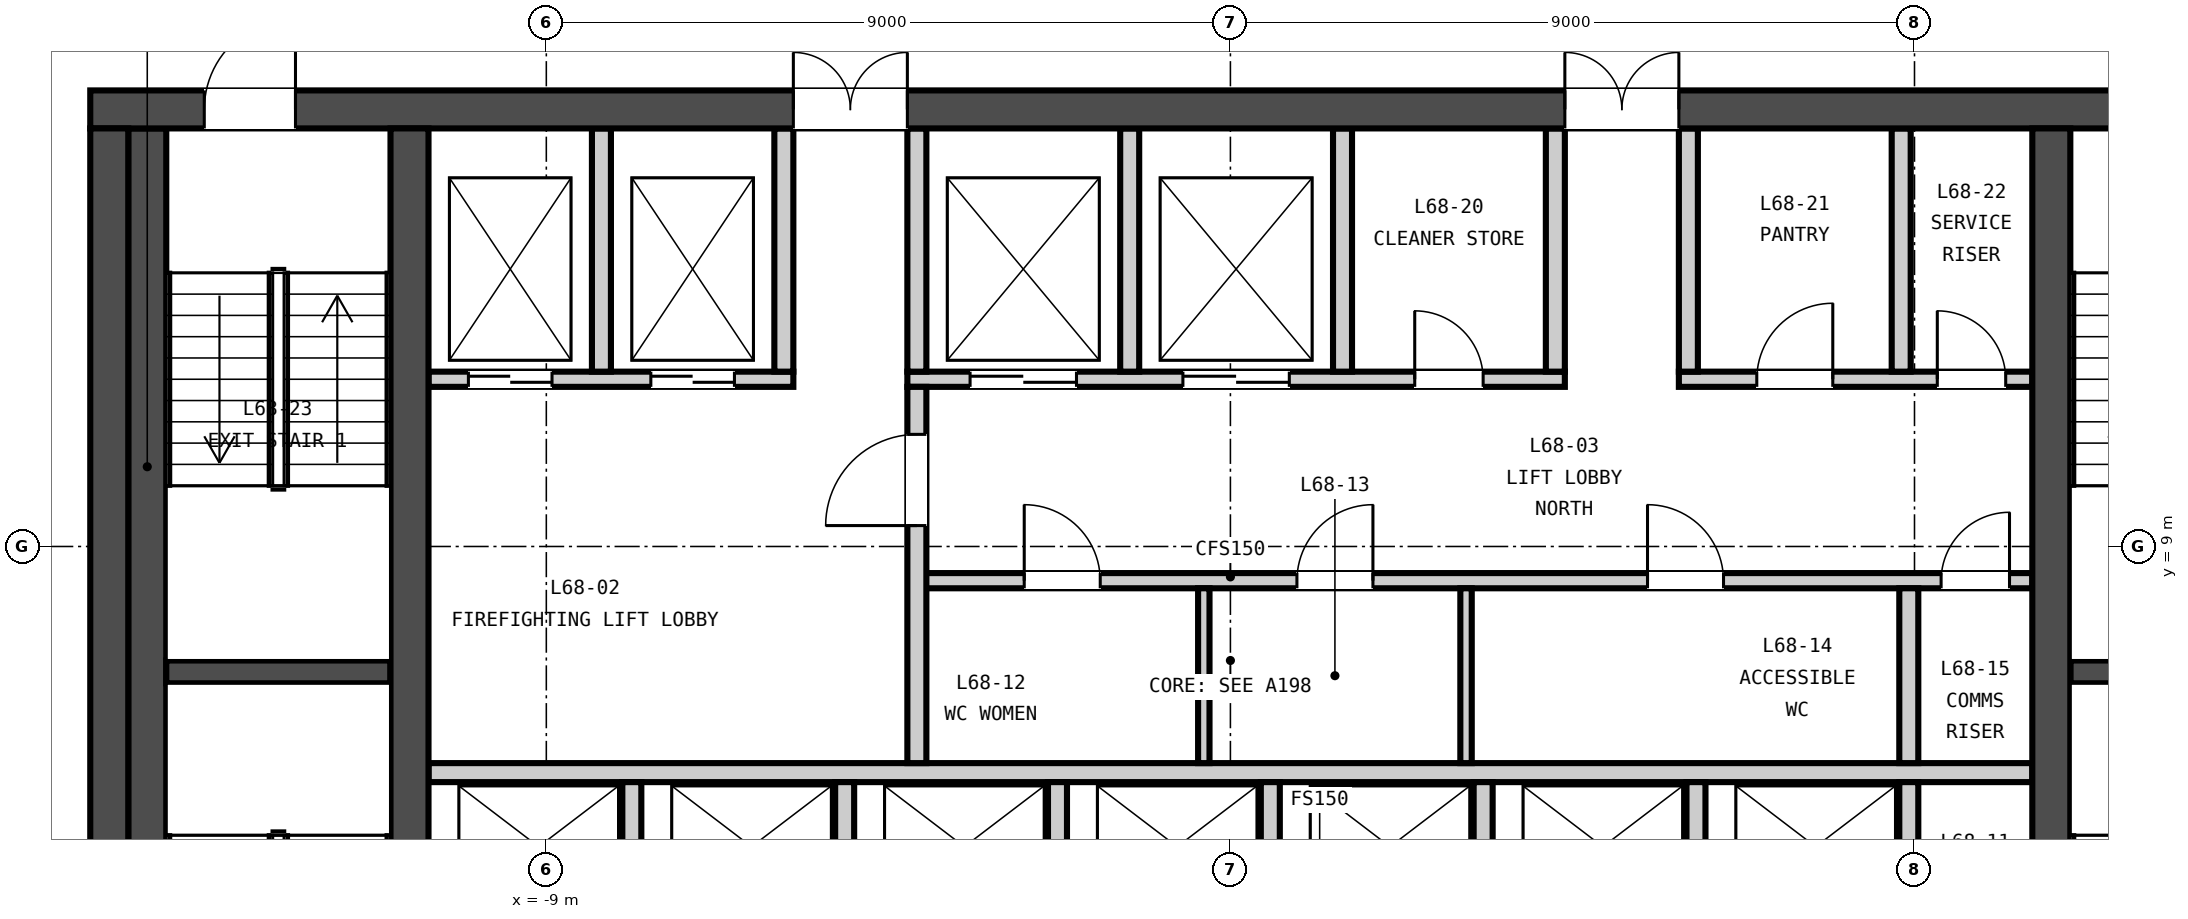
"""IFC4 building model, lengths in metres.
Left out: names, types, materials, properties, quantities, classifications, styles, units other than length and angle.
Written with IfcOpenShell. Run it as: python <this file> out.ifc"""

import sys

from ifc_helpers import new_model, si_unit, direction, frame, frame_2d, origin, place, context, subcontext, project, spatial, rectangle, extrude, element, fill, save


model = new_model("IFC4")
c1 = context("Model", 3, precision=1e-05, world=origin(), true_north=direction((0.0, 1.0)))
c2 = subcontext(c1, "Body", "Model", "MODEL_VIEW")
j1 = project(units=[si_unit("LENGTHUNIT", "METRE"), si_unit("PLANEANGLEUNIT", "RADIAN")], contexts=[c1])
p1 = place(None, origin())
s1 = spatial("IfcSite", under=j1, at=p1, CompositionType="ELEMENT")
p2 = place(p1, origin())
s2 = spatial("IfcBuilding", under=s1, at=p2, CompositionType="ELEMENT")
p3 = place(p2, frame((0.0, 0.0, 268.25)))
s3 = spatial("IfcBuildingStorey", under=s2, at=p3, CompositionType="ELEMENT", Elevation=268.25)
p4 = place(p3, frame((-15.0, 14.75, -0.15), z_axis=(0.0, 0.0, 1.0), x_axis=(1.0, 0.0, 0.0)))
e1 = element("IfcWall", 1, at=p4, inside=s3, PredefinedType="SOLIDWALL", context=c2, shape_type="SweptSolid", body=[
    extrude(rectangle(XDim=30.0, YDim=0.5, at=frame_2d((15.0, 0.0))), origin(), (0.0, 0.0, 1.0), 3.65),
])
p5 = place(p4, frame((9.25, 0.0, 0.15)))
e2 = element("IfcOpeningElement", 2, at=p5, cuts=e1, PredefinedType="OPENING", context=c2, shape_type="SweptSolid", body=[
    extrude(rectangle(XDim=1.5, YDim=2.1, at=frame_2d((0.75, 1.05))), frame((0.0, 0.26, 0.0), z_axis=(0.0, -1.0, 0.0), x_axis=(1.0, 0.0, 0.0)), (0.0, 0.0, 1.0), 0.52),
])
p6 = place(p4, frame((19.4, 0.0, 0.15)))
e3 = element("IfcOpeningElement", 3, at=p6, cuts=e1, PredefinedType="OPENING", context=c2, shape_type="SweptSolid", body=[
    extrude(rectangle(XDim=1.5, YDim=2.1, at=frame_2d((0.75, 1.05))), frame((0.0, 0.26, 0.0), z_axis=(0.0, -1.0, 0.0), x_axis=(1.0, 0.0, 0.0)), (0.0, 0.0, 1.0), 0.52),
])
p7 = place(p4, frame((1.5, 0.0, 0.15)))
e4 = element("IfcOpeningElement", 4, at=p7, cuts=e1, PredefinedType="OPENING", context=c2, shape_type="SweptSolid", body=[
    extrude(rectangle(XDim=1.2, YDim=2.1, at=frame_2d((0.6, 1.05))), frame((0.0, 0.26, 0.0), z_axis=(0.0, -1.0, 0.0), x_axis=(1.0, 0.0, 0.0)), (0.0, 0.0, 1.0), 0.52),
])
p8 = place(p4, frame((27.3, 0.0, 0.15)))
e5 = element("IfcOpeningElement", 5, at=p8, cuts=e1, PredefinedType="OPENING", context=c2, shape_type="SweptSolid", body=[
    extrude(rectangle(XDim=1.2, YDim=2.1, at=frame_2d((0.6, 1.05))), frame((0.0, 0.26, 0.0), z_axis=(0.0, -1.0, 0.0), x_axis=(1.0, 0.0, 0.0)), (0.0, 0.0, 1.0), 0.52),
])
for number, where, z_axis, x_axis in (
    (6, (-14.75, 0.5, -0.15), (0.0, 0.0, 1.0), (0.0, 1.0, 0.0)),
    (7, (-10.8, 0.5, -0.15), (0.0, 0.0, 1.0), (0.0, 1.0, 0.0)),
    (8, (10.8, 0.5, -0.15), (0.0, 0.0, 1.0), (0.0, 1.0, 0.0)),
):
    element("IfcWall", number, at=place(p3, frame(where, z_axis=z_axis, x_axis=x_axis)), inside=s3, PredefinedType="SOLIDWALL", context=c2, shape_type="SweptSolid", body=[
        extrude(rectangle(XDim=14.0, YDim=0.5, at=frame_2d((7.0, 0.0))), origin(), (0.0, 0.0, 1.0), 3.65),
    ])
p9 = place(p3, frame((-10.55, 6.025, 0.0), z_axis=(0.0, 0.0, 1.0), x_axis=(1.0, 0.0, 0.0)))
e9 = element("IfcWall", 9, at=p9, inside=s3, PredefinedType="PARTITIONING", context=c2, shape_type="SweptSolid", body=[
    extrude(rectangle(XDim=21.1, YDim=0.25, at=frame_2d((10.55, 0.0))), origin(), (0.0, 0.0, 1.0), 3.5),
])
p10 = place(p3, frame((-4.125, 8.55, 0.0), z_axis=(0.0, 0.0, 1.0), x_axis=(1.0, 0.0, 0.0)))
e10 = element("IfcWall", 10, at=p10, inside=s3, PredefinedType="PARTITIONING", context=c2, shape_type="SweptSolid", body=[
    extrude(rectangle(XDim=14.675, YDim=0.2, at=frame_2d((7.337, 0.0))), origin(), (0.0, 0.0, 1.0), 3.5),
])
p11 = place(p10, frame((1.413, 0.0, 0.0)))
e11 = element("IfcOpeningElement", 11, at=p11, cuts=e10, PredefinedType="OPENING", context=c2, shape_type="SweptSolid", body=[
    extrude(rectangle(XDim=1.0, YDim=2.1, at=frame_2d((0.5, 1.05))), frame((0.0, 0.11, 0.0), z_axis=(0.0, -1.0, 0.0), x_axis=(1.0, 0.0, 0.0)), (0.0, 0.0, 1.0), 0.22),
])
p12 = place(p10, frame((5.0, 0.0, 0.0)))
e12 = element("IfcOpeningElement", 12, at=p12, cuts=e10, PredefinedType="OPENING", context=c2, shape_type="SweptSolid", body=[
    extrude(rectangle(XDim=1.0, YDim=2.1, at=frame_2d((0.5, 1.05))), frame((0.0, 0.11, 0.0), z_axis=(0.0, -1.0, 0.0), x_axis=(1.0, 0.0, 0.0)), (0.0, 0.0, 1.0), 0.22),
])
p13 = place(p10, frame((9.613, 0.0, 0.0)))
e13 = element("IfcOpeningElement", 13, at=p13, cuts=e10, PredefinedType="OPENING", context=c2, shape_type="SweptSolid", body=[
    extrude(rectangle(XDim=1.0, YDim=2.1, at=frame_2d((0.5, 1.05))), frame((0.0, 0.11, 0.0), z_axis=(0.0, -1.0, 0.0), x_axis=(1.0, 0.0, 0.0)), (0.0, 0.0, 1.0), 0.22),
])
p14 = place(p10, frame((13.475, 0.0, 0.0)))
e14 = element("IfcOpeningElement", 14, at=p14, cuts=e10, PredefinedType="OPENING", context=c2, shape_type="SweptSolid", body=[
    extrude(rectangle(XDim=0.9, YDim=2.1, at=frame_2d((0.45, 1.05))), frame((0.0, 0.11, 0.0), z_axis=(0.0, -1.0, 0.0), x_axis=(1.0, 0.0, 0.0)), (0.0, 0.0, 1.0), 0.22),
])
p15 = place(p3, frame((-10.55, 11.2, 0.0), z_axis=(0.0, 0.0, 1.0), x_axis=(1.0, 0.0, 0.0)))
e15 = element("IfcWall", 15, at=p15, inside=s3, PredefinedType="PARTITIONING", context=c2, shape_type="SweptSolid", body=[
    extrude(rectangle(XDim=4.8, YDim=0.2, at=frame_2d((2.4, 0.0))), origin(), (0.0, 0.0, 1.0), 3.5),
])
p16 = place(p15, frame((0.525, 0.0, 0.0)))
e16 = element("IfcOpeningElement", 16, at=p16, cuts=e15, PredefinedType="OPENING", context=c2, shape_type="SweptSolid", body=[
    extrude(rectangle(XDim=1.1, YDim=2.1, at=frame_2d((0.55, 1.05))), frame((0.0, 0.11, 0.0), z_axis=(0.0, -1.0, 0.0), x_axis=(1.0, 0.0, 0.0)), (0.0, 0.0, 1.0), 0.22),
])
p17 = place(p15, frame((2.925, 0.0, 0.0)))
e17 = element("IfcOpeningElement", 17, at=p17, cuts=e15, PredefinedType="OPENING", context=c2, shape_type="SweptSolid", body=[
    extrude(rectangle(XDim=1.1, YDim=2.1, at=frame_2d((0.55, 1.05))), frame((0.0, 0.11, 0.0), z_axis=(0.0, -1.0, 0.0), x_axis=(1.0, 0.0, 0.0)), (0.0, 0.0, 1.0), 0.22),
])
p18 = place(p3, frame((-4.25, 11.2, 0.0), z_axis=(0.0, 0.0, 1.0), x_axis=(1.0, 0.0, 0.0)))
e18 = element("IfcWall", 18, at=p18, inside=s3, PredefinedType="PARTITIONING", context=c2, shape_type="SweptSolid", body=[
    extrude(rectangle(XDim=8.65, YDim=0.2, at=frame_2d((4.325, 0.0))), origin(), (0.0, 0.0, 1.0), 3.5),
])
p19 = place(p18, frame((0.825, 0.0, 0.0)))
e19 = element("IfcOpeningElement", 19, at=p19, cuts=e18, PredefinedType="OPENING", context=c2, shape_type="SweptSolid", body=[
    extrude(rectangle(XDim=1.4, YDim=2.1, at=frame_2d((0.7, 1.05))), frame((0.0, 0.11, 0.0), z_axis=(0.0, -1.0, 0.0), x_axis=(1.0, 0.0, 0.0)), (0.0, 0.0, 1.0), 0.22),
])
p20 = place(p18, frame((3.625, 0.0, 0.0)))
e20 = element("IfcOpeningElement", 20, at=p20, cuts=e18, PredefinedType="OPENING", context=c2, shape_type="SweptSolid", body=[
    extrude(rectangle(XDim=1.4, YDim=2.1, at=frame_2d((0.7, 1.05))), frame((0.0, 0.11, 0.0), z_axis=(0.0, -1.0, 0.0), x_axis=(1.0, 0.0, 0.0)), (0.0, 0.0, 1.0), 0.22),
])
p21 = place(p18, frame((6.675, 0.0, 0.0)))
e21 = element("IfcOpeningElement", 21, at=p21, cuts=e18, PredefinedType="OPENING", context=c2, shape_type="SweptSolid", body=[
    extrude(rectangle(XDim=0.9, YDim=2.1, at=frame_2d((0.45, 1.05))), frame((0.0, 0.11, 0.0), z_axis=(0.0, -1.0, 0.0), x_axis=(1.0, 0.0, 0.0)), (0.0, 0.0, 1.0), 0.22),
])
p22 = place(p3, frame((5.9, 11.2, 0.0), z_axis=(0.0, 0.0, 1.0), x_axis=(1.0, 0.0, 0.0)))
e22 = element("IfcWall", 22, at=p22, inside=s3, PredefinedType="PARTITIONING", context=c2, shape_type="SweptSolid", body=[
    extrude(rectangle(XDim=4.65, YDim=0.2, at=frame_2d((2.325, 0.0))), origin(), (0.0, 0.0, 1.0), 3.5),
])
p23 = place(p22, frame((1.025, 0.0, 0.0)))
e23 = element("IfcOpeningElement", 23, at=p23, cuts=e22, PredefinedType="OPENING", context=c2, shape_type="SweptSolid", body=[
    extrude(rectangle(XDim=1.0, YDim=2.1, at=frame_2d((0.5, 1.05))), frame((0.0, 0.11, 0.0), z_axis=(0.0, -1.0, 0.0), x_axis=(1.0, 0.0, 0.0)), (0.0, 0.0, 1.0), 0.22),
])
p24 = place(p22, frame((3.4, 0.0, 0.0)))
e24 = element("IfcOpeningElement", 24, at=p24, cuts=e22, PredefinedType="OPENING", context=c2, shape_type="SweptSolid", body=[
    extrude(rectangle(XDim=0.9, YDim=2.1, at=frame_2d((0.45, 1.05))), frame((0.0, 0.11, 0.0), z_axis=(0.0, -1.0, 0.0), x_axis=(1.0, 0.0, 0.0)), (0.0, 0.0, 1.0), 0.22),
])
p25 = place(p3, frame((-4.125, 6.15, 0.0), z_axis=(0.0, 0.0, 1.0), x_axis=(0.0, 1.0, 0.0)))
e25 = element("IfcWall", 25, at=p25, inside=s3, PredefinedType="PARTITIONING", context=c2, shape_type="SweptSolid", body=[
    extrude(rectangle(XDim=4.95, YDim=0.25, at=frame_2d((2.475, 0.0))), origin(), (0.0, 0.0, 1.0), 3.5),
])
p26 = place(p25, frame((3.125, 0.0, 0.0)))
e26 = element("IfcOpeningElement", 26, at=p26, cuts=e25, PredefinedType="OPENING", context=c2, shape_type="SweptSolid", body=[
    extrude(rectangle(XDim=1.2, YDim=2.1, at=frame_2d((0.6, 1.05))), frame((0.0, 0.135, 0.0), z_axis=(0.0, -1.0, 0.0), x_axis=(1.0, 0.0, 0.0)), (0.0, 0.0, 1.0), 0.27),
])
for number, where, z_axis, x_axis in (
    (27, (-7.875, 3.6, 0.0), (0.0, 0.0, 1.0), (0.0, 1.0, 0.0)),
    (28, (-5.075, 3.6, 0.0), (0.0, 0.0, 1.0), (0.0, 1.0, 0.0)),
    (29, (-2.275, 3.6, 0.0), (0.0, 0.0, 1.0), (0.0, 1.0, 0.0)),
    (30, (0.525, 3.6, 0.0), (0.0, 0.0, 1.0), (0.0, 1.0, 0.0)),
    (31, (3.325, 3.6, 0.0), (0.0, 0.0, 1.0), (0.0, 1.0, 0.0)),
    (32, (6.125, 3.6, 0.0), (0.0, 0.0, 1.0), (0.0, 1.0, 0.0)),
    (33, (8.925, 3.6, 0.0), (0.0, 0.0, 1.0), (0.0, 1.0, 0.0)),
):
    element("IfcWall", number, at=place(p3, frame(where, z_axis=z_axis, x_axis=x_axis)), inside=s3, PredefinedType="PARTITIONING", context=c2, shape_type="SweptSolid", body=[
        extrude(rectangle(XDim=2.3, YDim=0.25, at=frame_2d((1.15, 0.0))), origin(), (0.0, 0.0, 1.0), 3.5),
    ])
for number, where, z_axis, x_axis in (
    (34, (-0.35, 6.15, 0.0), (0.0, 0.0, 1.0), (0.0, 1.0, 0.0)),
    (35, (3.1, 6.15, 0.0), (0.0, 0.0, 1.0), (0.0, 1.0, 0.0)),
):
    element("IfcWall", number, at=place(p3, frame(where, z_axis=z_axis, x_axis=x_axis)), inside=s3, PredefinedType="PARTITIONING", context=c2, shape_type="SweptSolid", body=[
        extrude(rectangle(XDim=2.3, YDim=0.15, at=frame_2d((1.15, 0.0))), origin(), (0.0, 0.0, 1.0), 3.5),
    ])
p27 = place(p3, frame((8.925, 6.15, 0.0), z_axis=(0.0, 0.0, 1.0), x_axis=(0.0, 1.0, 0.0)))
e36 = element("IfcWall", 36, at=p27, inside=s3, PredefinedType="PARTITIONING", context=c2, shape_type="SweptSolid", body=[
    extrude(rectangle(XDim=2.3, YDim=0.25, at=frame_2d((1.15, 0.0))), origin(), (0.0, 0.0, 1.0), 3.5),
])
for number, where, z_axis, x_axis in (
    (37, (-8.275, 11.3, 0.0), (0.0, 0.0, 1.0), (0.0, 1.0, 0.0)),
    (38, (-5.875, 11.3, 0.0), (0.0, 0.0, 1.0), (0.0, 1.0, 0.0)),
    (39, (-4.125, 11.3, 0.0), (0.0, 0.0, 1.0), (0.0, 1.0, 0.0)),
    (40, (-1.325, 11.3, 0.0), (0.0, 0.0, 1.0), (0.0, 1.0, 0.0)),
    (41, (1.475, 11.3, 0.0), (0.0, 0.0, 1.0), (0.0, 1.0, 0.0)),
    (42, (4.275, 11.3, 0.0), (0.0, 0.0, 1.0), (0.0, 1.0, 0.0)),
    (43, (6.025, 11.3, 0.0), (0.0, 0.0, 1.0), (0.0, 1.0, 0.0)),
    (44, (8.825, 11.3, 0.0), (0.0, 0.0, 1.0), (0.0, 1.0, 0.0)),
):
    element("IfcWall", number, at=place(p3, frame(where, z_axis=z_axis, x_axis=x_axis)), inside=s3, PredefinedType="PARTITIONING", context=c2, shape_type="SweptSolid", body=[
        extrude(rectangle(XDim=3.2, YDim=0.25, at=frame_2d((1.6, 0.0))), origin(), (0.0, 0.0, 1.0), 3.5),
    ])
p28 = place(p3, frame((-14.0, 7.35, 0.0), z_axis=(0.0, 0.0, 1.0), x_axis=(1.0, 0.0, 0.0)))
e45 = element("IfcWall", 45, at=p28, inside=s3, PredefinedType="SOLIDWALL", context=c2, shape_type="SweptSolid", body=[
    extrude(rectangle(XDim=2.95, YDim=0.3, at=frame_2d((1.475, 0.0))), origin(), (0.0, 0.0, 1.0), 3.5),
])
p29 = place(p3, frame((-14.25, 0.5, 0.0), z_axis=(0.0, 0.0, 1.0), x_axis=(0.0, 1.0, 0.0)))
e46 = element("IfcWall", 46, at=p29, inside=s3, PredefinedType="SOLIDWALL", context=c2, shape_type="SweptSolid", body=[
    extrude(rectangle(XDim=14.0, YDim=0.5, at=frame_2d((7.0, 0.0))), origin(), (0.0, 0.0, 1.0), 3.5),
])
p30 = place(p3, frame((11.05, 7.35, 0.0), z_axis=(0.0, 0.0, 1.0), x_axis=(1.0, 0.0, 0.0)))
e47 = element("IfcWall", 47, at=p30, inside=s3, PredefinedType="SOLIDWALL", context=c2, shape_type="SweptSolid", body=[
    extrude(rectangle(XDim=2.95, YDim=0.3, at=frame_2d((1.475, 0.0))), origin(), (0.0, 0.0, 1.0), 3.5),
])
p31 = place(p3, frame((-17.377, 11.232, 0.0), z_axis=(0.0, 0.0, 1.0), x_axis=(0.309001632963, 0.951061507383, 0.0)))
e48 = element("IfcWall", 48, at=p31, inside=s3, PredefinedType="PARTITIONING", context=c2, shape_type="SweptSolid", body=[
    extrude(rectangle(XDim=6.211, YDim=0.15, at=frame_2d((3.105, 0.0))), origin(), (0.0, 0.0, 1.0), 2.751),
])
p32 = place(p26, origin())
e49 = element("IfcDoor", 49, at=p32, inside=s3, OperationType="SINGLE_SWING_LEFT", PredefinedType="DOOR", context=c2, shape_type="SweptSolid", body=[
    extrude(rectangle(XDim=1.2, YDim=2.1, at=frame_2d((0.6, 1.05))), frame((0.0, 0.025, 0.0), z_axis=(0.0, -1.0, 0.0), x_axis=(1.0, 0.0, 0.0)), (0.0, 0.0, 1.0), 0.05),
])
fill(e26, e49)
p33 = place(p11, origin())
e50 = element("IfcDoor", 50, at=p33, inside=s3, OperationType="SINGLE_SWING_LEFT", PredefinedType="DOOR", context=c2, shape_type="SweptSolid", body=[
    extrude(rectangle(XDim=1.0, YDim=2.1, at=frame_2d((0.5, 1.05))), frame((0.0, 0.025, 0.0), z_axis=(0.0, -1.0, 0.0), x_axis=(1.0, 0.0, 0.0)), (0.0, 0.0, 1.0), 0.05),
])
fill(e11, e50)
p34 = place(p12, origin())
e51 = element("IfcDoor", 51, at=p34, inside=s3, OperationType="SINGLE_SWING_RIGHT", PredefinedType="DOOR", context=c2, shape_type="SweptSolid", body=[
    extrude(rectangle(XDim=1.0, YDim=2.1, at=frame_2d((0.5, 1.05))), frame((0.0, 0.025, 0.0), z_axis=(0.0, -1.0, 0.0), x_axis=(1.0, 0.0, 0.0)), (0.0, 0.0, 1.0), 0.05),
])
fill(e12, e51)
p35 = place(p13, origin())
e52 = element("IfcDoor", 52, at=p35, inside=s3, OperationType="SINGLE_SWING_LEFT", PredefinedType="DOOR", context=c2, shape_type="SweptSolid", body=[
    extrude(rectangle(XDim=1.0, YDim=2.1, at=frame_2d((0.5, 1.05))), frame((0.0, 0.025, 0.0), z_axis=(0.0, -1.0, 0.0), x_axis=(1.0, 0.0, 0.0)), (0.0, 0.0, 1.0), 0.05),
])
fill(e13, e52)
p36 = place(p14, origin())
e53 = element("IfcDoor", 53, at=p36, inside=s3, OperationType="SINGLE_SWING_RIGHT", PredefinedType="DOOR", context=c2, shape_type="SweptSolid", body=[
    extrude(rectangle(XDim=0.9, YDim=2.1, at=frame_2d((0.45, 1.05))), frame((0.0, 0.025, 0.0), z_axis=(0.0, -1.0, 0.0), x_axis=(1.0, 0.0, 0.0)), (0.0, 0.0, 1.0), 0.05),
])
fill(e14, e53)
p37 = place(p16, origin())
e54 = element("IfcDoor", 54, at=p37, inside=s3, OperationType="DOUBLE_DOOR_SLIDING", PredefinedType="DOOR", context=c2, shape_type="SweptSolid", body=[
    extrude(rectangle(XDim=1.1, YDim=2.1, at=frame_2d((0.55, 1.05))), frame((0.0, 0.025, 0.0), z_axis=(0.0, -1.0, 0.0), x_axis=(1.0, 0.0, 0.0)), (0.0, 0.0, 1.0), 0.05),
])
fill(e16, e54)
p38 = place(p17, origin())
e55 = element("IfcDoor", 55, at=p38, inside=s3, OperationType="DOUBLE_DOOR_SLIDING", PredefinedType="DOOR", context=c2, shape_type="SweptSolid", body=[
    extrude(rectangle(XDim=1.1, YDim=2.1, at=frame_2d((0.55, 1.05))), frame((0.0, 0.025, 0.0), z_axis=(0.0, -1.0, 0.0), x_axis=(1.0, 0.0, 0.0)), (0.0, 0.0, 1.0), 0.05),
])
fill(e17, e55)
p39 = place(p19, origin())
e56 = element("IfcDoor", 56, at=p39, inside=s3, OperationType="DOUBLE_DOOR_SLIDING", PredefinedType="DOOR", context=c2, shape_type="SweptSolid", body=[
    extrude(rectangle(XDim=1.4, YDim=2.1, at=frame_2d((0.7, 1.05))), frame((0.0, 0.025, 0.0), z_axis=(0.0, -1.0, 0.0), x_axis=(1.0, 0.0, 0.0)), (0.0, 0.0, 1.0), 0.05),
])
fill(e19, e56)
p40 = place(p20, origin())
e57 = element("IfcDoor", 57, at=p40, inside=s3, OperationType="DOUBLE_DOOR_SLIDING", PredefinedType="DOOR", context=c2, shape_type="SweptSolid", body=[
    extrude(rectangle(XDim=1.4, YDim=2.1, at=frame_2d((0.7, 1.05))), frame((0.0, 0.025, 0.0), z_axis=(0.0, -1.0, 0.0), x_axis=(1.0, 0.0, 0.0)), (0.0, 0.0, 1.0), 0.05),
])
fill(e20, e57)
p41 = place(p21, origin())
e58 = element("IfcDoor", 58, at=p41, inside=s3, OperationType="SINGLE_SWING_LEFT", PredefinedType="DOOR", context=c2, shape_type="SweptSolid", body=[
    extrude(rectangle(XDim=0.9, YDim=2.1, at=frame_2d((0.45, 1.05))), frame((0.0, 0.025, 0.0), z_axis=(0.0, -1.0, 0.0), x_axis=(1.0, 0.0, 0.0)), (0.0, 0.0, 1.0), 0.05),
])
fill(e21, e58)
p42 = place(p23, origin())
e59 = element("IfcDoor", 59, at=p42, inside=s3, OperationType="SINGLE_SWING_RIGHT", PredefinedType="DOOR", context=c2, shape_type="SweptSolid", body=[
    extrude(rectangle(XDim=1.0, YDim=2.1, at=frame_2d((0.5, 1.05))), frame((0.0, 0.025, 0.0), z_axis=(0.0, -1.0, 0.0), x_axis=(1.0, 0.0, 0.0)), (0.0, 0.0, 1.0), 0.05),
])
fill(e23, e59)
p43 = place(p24, origin())
e60 = element("IfcDoor", 60, at=p43, inside=s3, OperationType="SINGLE_SWING_LEFT", PredefinedType="DOOR", context=c2, shape_type="SweptSolid", body=[
    extrude(rectangle(XDim=0.9, YDim=2.1, at=frame_2d((0.45, 1.05))), frame((0.0, 0.025, 0.0), z_axis=(0.0, -1.0, 0.0), x_axis=(1.0, 0.0, 0.0)), (0.0, 0.0, 1.0), 0.05),
])
fill(e24, e60)
p44 = place(p5, origin())
e61 = element("IfcDoor", 61, at=p44, inside=s3, OperationType="DOUBLE_DOOR_SINGLE_SWING", PredefinedType="DOOR", context=c2, shape_type="SweptSolid", body=[
    extrude(rectangle(XDim=1.5, YDim=2.1, at=frame_2d((0.75, 1.05))), frame((0.0, 0.025, 0.0), z_axis=(0.0, -1.0, 0.0), x_axis=(1.0, 0.0, 0.0)), (0.0, 0.0, 1.0), 0.05),
])
fill(e2, e61)
p45 = place(p6, origin())
e62 = element("IfcDoor", 62, at=p45, inside=s3, OperationType="DOUBLE_DOOR_SINGLE_SWING", PredefinedType="DOOR", context=c2, shape_type="SweptSolid", body=[
    extrude(rectangle(XDim=1.5, YDim=2.1, at=frame_2d((0.75, 1.05))), frame((0.0, 0.025, 0.0), z_axis=(0.0, -1.0, 0.0), x_axis=(1.0, 0.0, 0.0)), (0.0, 0.0, 1.0), 0.05),
])
fill(e3, e62)
p46 = place(p7, origin())
e63 = element("IfcDoor", 63, at=p46, inside=s3, OperationType="SINGLE_SWING_RIGHT", PredefinedType="DOOR", context=c2, shape_type="SweptSolid", body=[
    extrude(rectangle(XDim=1.2, YDim=2.1, at=frame_2d((0.6, 1.05))), frame((0.0, 0.025, 0.0), z_axis=(0.0, -1.0, 0.0), x_axis=(1.0, 0.0, 0.0)), (0.0, 0.0, 1.0), 0.05),
])
fill(e4, e63)
save(model, sys.argv[1])
